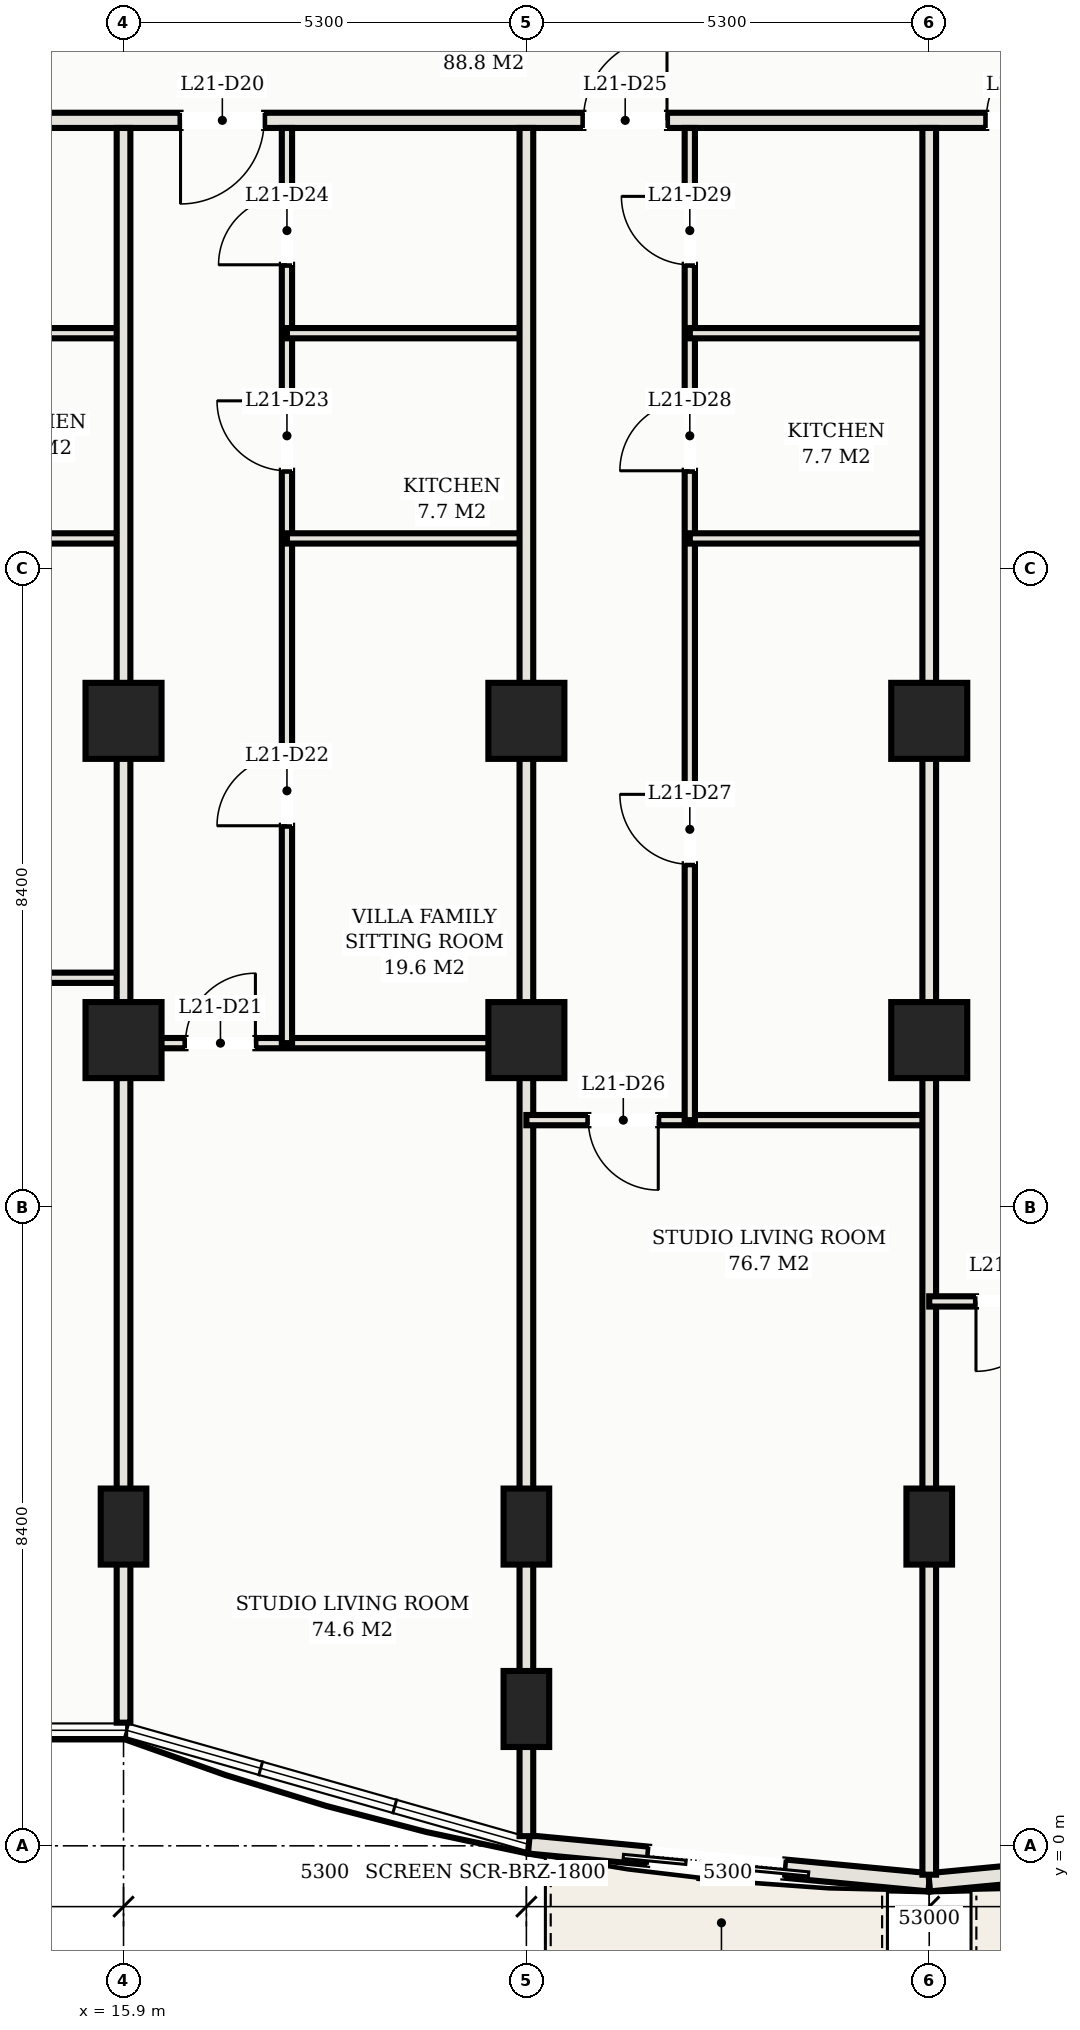
"""IFC4 building model, lengths in metres.
Left out: names, types, materials, properties, quantities, classifications, styles, units other than length and angle.
Written with IfcOpenShell. Run it as: python <this file> out.ifc"""

import sys

from ifc_helpers import new_model, si_unit, direction, frame, frame_2d, origin, origin_2d, place, context, subcontext, project, spatial, rectangle, hollow_rectangle, extrude, element, fill, save


model = new_model("IFC4")
c1 = context("Model", 3, precision=1e-05, world=origin(), true_north=direction((0.0, 1.0)))
c2 = subcontext(c1, "Body", "Model", "MODEL_VIEW")
j1 = project(units=[si_unit("LENGTHUNIT", "METRE"), si_unit("PLANEANGLEUNIT", "RADIAN")], contexts=[c1])
p1 = place(None, origin())
s1 = spatial("IfcSite", under=j1, at=p1, CompositionType="ELEMENT")
p2 = place(p1, origin())
s2 = spatial("IfcBuilding", under=s1, at=p2, CompositionType="ELEMENT")
p3 = place(p2, frame((0.0, 0.0, 81.7)))
s3 = spatial("IfcBuildingStorey", under=s2, at=p3, CompositionType="ELEMENT", Elevation=81.7)
for number, where, z_axis, x_axis in (
    (1, (15.9, 14.8, 0.0), (0.0, 0.0, 1.0), (1.0, 0.0, 0.0)),
    (2, (15.9, 10.6, 0.0), (0.0, 0.0, 1.0), (1.0, 0.0, 0.0)),
    (3, (21.2, 14.8, 0.0), (0.0, 0.0, 1.0), (1.0, 0.0, 0.0)),
    (4, (21.2, 10.6, 0.0), (0.0, 0.0, 1.0), (1.0, 0.0, 0.0)),
    (5, (26.5, 14.8, 0.0), (0.0, 0.0, 1.0), (1.0, 0.0, 0.0)),
    (6, (26.5, 10.6, 0.0), (0.0, 0.0, 1.0), (1.0, 0.0, 0.0)),
):
    element("IfcColumn", number, at=place(p3, frame(where, z_axis=z_axis, x_axis=x_axis)), inside=s3, PredefinedType="COLUMN", context=c2, shape_type="SweptSolid", body=[
        extrude(hollow_rectangle(XDim=1.0, YDim=1.0, WallThickness=0.036, at=origin_2d()), origin(), (0.0, 0.0, 1.0), 3.3),
    ])
for number, where, z_axis, x_axis in (
    (7, (21.2, 1.8, 0.0), (0.0, 0.0, 1.0), (1.0, 0.0, 0.0)),
    (8, (15.9, 4.2, 0.0), (0.0, 0.0, 1.0), (1.0, 0.0, 0.0)),
    (9, (21.2, 4.2, 0.0), (0.0, 0.0, 1.0), (1.0, 0.0, 0.0)),
    (10, (26.5, 4.2, 0.0), (0.0, 0.0, 1.0), (1.0, 0.0, 0.0)),
):
    element("IfcColumn", number, at=place(p3, frame(where, z_axis=z_axis, x_axis=x_axis)), inside=s3, PredefinedType="COLUMN", context=c2, shape_type="SweptSolid", body=[
        extrude(hollow_rectangle(XDim=0.6, YDim=1.0, WallThickness=0.032, at=origin_2d()), origin(), (0.0, 0.0, 1.0), 3.3),
    ])
p4 = place(p3, frame((21.232, 0.018, 0.0), z_axis=(0.0, 0.0, 1.0), x_axis=(0.995560760834, -0.094121046997, 0.0)))
e11 = element("IfcWall", 11, at=p4, inside=s3, PredefinedType="SOLIDWALL", context=c2, shape_type="SweptSolid", body=[
    extrude(rectangle(XDim=5.292, YDim=0.24, at=frame_2d((2.646, 0.0))), origin(), (0.0, 0.0, 1.0), 3.09),
])
p5 = place(p4, frame((1.577, 0.0, 0.0)))
e12 = element("IfcOpeningElement", 12, at=p5, cuts=e11, PredefinedType="OPENING", context=c2, shape_type="SweptSolid", body=[
    extrude(rectangle(XDim=1.8, YDim=2.2, at=frame_2d((0.9, 1.1))), frame((0.0, 0.13, 0.0), z_axis=(0.0, -1.0, 0.0), x_axis=(1.0, 0.0, 0.0)), (0.0, 0.0, 1.0), 0.26),
])
p6 = place(p3, frame((26.5, -0.48, 0.0), z_axis=(0.0, 0.0, 1.0), x_axis=(0.995560760834, 0.094121046997, 0.0)))
e13 = element("IfcWall", 13, at=p6, inside=s3, PredefinedType="SOLIDWALL", context=c2, shape_type="SweptSolid", body=[
    extrude(rectangle(XDim=5.292, YDim=0.24, at=frame_2d((2.646, 0.0))), origin(), (0.0, 0.0, 1.0), 3.09),
])
p7 = place(p6, frame((1.914, 0.0, 0.0)))
e14 = element("IfcOpeningElement", 14, at=p7, cuts=e13, PredefinedType="OPENING", context=c2, shape_type="SweptSolid", body=[
    extrude(rectangle(XDim=1.8, YDim=2.2, at=frame_2d((0.9, 1.1))), frame((0.0, 0.13, 0.0), z_axis=(0.0, -1.0, 0.0), x_axis=(1.0, 0.0, 0.0)), (0.0, 0.0, 1.0), 0.26),
])
p8 = place(p3, frame((1.62, 22.7, 0.0), z_axis=(0.0, 0.0, 1.0), x_axis=(1.0, 0.0, 0.0)))
e15 = element("IfcWall", 15, at=p8, inside=s3, PredefinedType="PARTITIONING", context=c2, shape_type="SweptSolid", body=[
    extrude(rectangle(XDim=49.76, YDim=0.2, at=frame_2d((24.88, 0.0))), origin(), (0.0, 0.0, 1.0), 2.38),
])
p9 = place(p8, frame((9.73, 0.0, 0.0)))
e16 = element("IfcOpeningElement", 16, at=p9, cuts=e15, PredefinedType="OPENING", context=c2, shape_type="SweptSolid", body=[
    extrude(rectangle(XDim=1.1, YDim=2.25, at=frame_2d((0.55, 1.125))), frame((0.0, 0.11, 0.0), z_axis=(0.0, -1.0, 0.0), x_axis=(1.0, 0.0, 0.0)), (0.0, 0.0, 1.0), 0.22),
])
p10 = place(p8, frame((15.03, 0.0, 0.0)))
e17 = element("IfcOpeningElement", 17, at=p10, cuts=e15, PredefinedType="OPENING", context=c2, shape_type="SweptSolid", body=[
    extrude(rectangle(XDim=1.1, YDim=2.25, at=frame_2d((0.55, 1.125))), frame((0.0, 0.11, 0.0), z_axis=(0.0, -1.0, 0.0), x_axis=(1.0, 0.0, 0.0)), (0.0, 0.0, 1.0), 0.22),
])
p11 = place(p8, frame((20.33, 0.0, 0.0)))
e18 = element("IfcOpeningElement", 18, at=p11, cuts=e15, PredefinedType="OPENING", context=c2, shape_type="SweptSolid", body=[
    extrude(rectangle(XDim=1.1, YDim=2.25, at=frame_2d((0.55, 1.125))), frame((0.0, 0.11, 0.0), z_axis=(0.0, -1.0, 0.0), x_axis=(1.0, 0.0, 0.0)), (0.0, 0.0, 1.0), 0.22),
])
p12 = place(p8, frame((25.63, 0.0, 0.0)))
e19 = element("IfcOpeningElement", 19, at=p12, cuts=e15, PredefinedType="OPENING", context=c2, shape_type="SweptSolid", body=[
    extrude(rectangle(XDim=1.1, YDim=2.25, at=frame_2d((0.55, 1.125))), frame((0.0, 0.11, 0.0), z_axis=(0.0, -1.0, 0.0), x_axis=(1.0, 0.0, 0.0)), (0.0, 0.0, 1.0), 0.22),
])
p13 = place(p8, frame((33.33, 0.0, 0.0)))
e20 = element("IfcOpeningElement", 20, at=p13, cuts=e15, PredefinedType="OPENING", context=c2, shape_type="SweptSolid", body=[
    extrude(rectangle(XDim=1.1, YDim=2.25, at=frame_2d((0.55, 1.125))), frame((0.0, 0.11, 0.0), z_axis=(0.0, -1.0, 0.0), x_axis=(1.0, 0.0, 0.0)), (0.0, 0.0, 1.0), 0.22),
])
p14 = place(p8, frame((3.985, 0.0, 0.0)))
e21 = element("IfcOpeningElement", 21, at=p14, cuts=e15, PredefinedType="OPENING", context=c2, shape_type="SweptSolid", body=[
    extrude(rectangle(XDim=0.92, YDim=2.15, at=frame_2d((0.46, 1.075))), frame((0.0, 0.11, 0.0), z_axis=(0.0, -1.0, 0.0), x_axis=(1.0, 0.0, 0.0)), (0.0, 0.0, 1.0), 0.22),
])
p15 = place(p8, frame((44.855, 0.0, 0.0)))
e22 = element("IfcOpeningElement", 22, at=p15, cuts=e15, PredefinedType="OPENING", context=c2, shape_type="SweptSolid", body=[
    extrude(rectangle(XDim=0.92, YDim=2.15, at=frame_2d((0.46, 1.075))), frame((0.0, 0.11, 0.0), z_axis=(0.0, -1.0, 0.0), x_axis=(1.0, 0.0, 0.0)), (0.0, 0.0, 1.0), 0.22),
])
p16 = place(p3, frame((10.6, 11.42, 0.0), z_axis=(0.0, 0.0, 1.0), x_axis=(1.0, 0.0, 0.0)))
e23 = element("IfcWall", 23, at=p16, inside=s3, PredefinedType="PARTITIONING", context=c2, shape_type="SweptSolid", body=[
    extrude(rectangle(XDim=5.3, YDim=0.135, at=frame_2d((2.65, 0.0))), origin(), (0.0, 0.0, 1.0), 2.38),
])
p17 = place(p16, frame((0.815, 0.0, 0.0)))
e24 = element("IfcOpeningElement", 24, at=p17, cuts=e23, PredefinedType="OPENING", context=c2, shape_type="SweptSolid", body=[
    extrude(rectangle(XDim=0.92, YDim=2.15, at=frame_2d((0.46, 1.075))), frame((0.0, 0.078, 0.0), z_axis=(0.0, -1.0, 0.0), x_axis=(1.0, 0.0, 0.0)), (0.0, 0.0, 1.0), 0.155),
])
for number, where, z_axis, x_axis in (
    (25, (12.75, 17.2, 0.0), (0.0, 0.0, 1.0), (1.0, 0.0, 0.0)),
    (26, (12.75, 19.9, 0.0), (0.0, 0.0, 1.0), (1.0, 0.0, 0.0)),
):
    element("IfcWall", number, at=place(p3, frame(where, z_axis=z_axis, x_axis=x_axis)), inside=s3, PredefinedType="PARTITIONING", context=c2, shape_type="SweptSolid", body=[
        extrude(rectangle(XDim=3.15, YDim=0.135, at=frame_2d((1.575, 0.0))), origin(), (0.0, 0.0, 1.0), 2.38),
    ])
p18 = place(p3, frame((15.9, 1.62, 0.0), z_axis=(0.0, 0.0, 1.0), x_axis=(0.0, 1.0, 0.0)))
e27 = element("IfcWall", 27, at=p18, inside=s3, PredefinedType="PARTITIONING", context=c2, shape_type="SweptSolid", body=[
    extrude(rectangle(XDim=20.98, YDim=0.18, at=frame_2d((10.49, 0.0))), origin(), (0.0, 0.0, 1.0), 2.335),
])
p19 = place(p3, frame((15.9, 10.56, 0.0), z_axis=(0.0, 0.0, 1.0), x_axis=(1.0, 0.0, 0.0)))
e28 = element("IfcWall", 28, at=p19, inside=s3, PredefinedType="PARTITIONING", context=c2, shape_type="SweptSolid", body=[
    extrude(rectangle(XDim=5.3, YDim=0.135, at=frame_2d((2.65, 0.0))), origin(), (0.0, 0.0, 1.0), 2.335),
])
p20 = place(p19, frame((0.815, 0.0, 0.0)))
e29 = element("IfcOpeningElement", 29, at=p20, cuts=e28, PredefinedType="OPENING", context=c2, shape_type="SweptSolid", body=[
    extrude(rectangle(XDim=0.92, YDim=2.15, at=frame_2d((0.46, 1.075))), frame((0.0, 0.078, 0.0), z_axis=(0.0, -1.0, 0.0), x_axis=(1.0, 0.0, 0.0)), (0.0, 0.0, 1.0), 0.155),
])
p21 = place(p3, frame((18.05, 10.56, 0.0), z_axis=(0.0, 0.0, 1.0), x_axis=(0.0, 1.0, 0.0)))
e30 = element("IfcWall", 30, at=p21, inside=s3, PredefinedType="PARTITIONING", context=c2, shape_type="SweptSolid", body=[
    extrude(rectangle(XDim=12.04, YDim=0.135, at=frame_2d((6.02, 0.0))), origin(), (0.0, 0.0, 1.0), 2.38),
])
p22 = place(p21, frame((2.86, 0.0, 0.0)))
e31 = element("IfcOpeningElement", 31, at=p22, cuts=e30, PredefinedType="OPENING", context=c2, shape_type="SweptSolid", body=[
    extrude(rectangle(XDim=0.92, YDim=2.15, at=frame_2d((0.46, 1.075))), frame((0.0, 0.078, 0.0), z_axis=(0.0, -1.0, 0.0), x_axis=(1.0, 0.0, 0.0)), (0.0, 0.0, 1.0), 0.155),
])
p23 = place(p21, frame((7.53, 0.0, 0.0)))
e32 = element("IfcOpeningElement", 32, at=p23, cuts=e30, PredefinedType="OPENING", context=c2, shape_type="SweptSolid", body=[
    extrude(rectangle(XDim=0.92, YDim=2.15, at=frame_2d((0.46, 1.075))), frame((0.0, 0.078, 0.0), z_axis=(0.0, -1.0, 0.0), x_axis=(1.0, 0.0, 0.0)), (0.0, 0.0, 1.0), 0.155),
])
p24 = place(p21, frame((10.24, 0.0, 0.0)))
e33 = element("IfcOpeningElement", 33, at=p24, cuts=e30, PredefinedType="OPENING", context=c2, shape_type="SweptSolid", body=[
    extrude(rectangle(XDim=0.9, YDim=2.15, at=frame_2d((0.45, 1.075))), frame((0.0, 0.078, 0.0), z_axis=(0.0, -1.0, 0.0), x_axis=(1.0, 0.0, 0.0)), (0.0, 0.0, 1.0), 0.155),
])
for number, where, z_axis, x_axis in (
    (34, (18.05, 17.2, 0.0), (0.0, 0.0, 1.0), (1.0, 0.0, 0.0)),
    (35, (18.05, 19.9, 0.0), (0.0, 0.0, 1.0), (1.0, 0.0, 0.0)),
):
    element("IfcWall", number, at=place(p3, frame(where, z_axis=z_axis, x_axis=x_axis)), inside=s3, PredefinedType="PARTITIONING", context=c2, shape_type="SweptSolid", body=[
        extrude(rectangle(XDim=3.15, YDim=0.135, at=frame_2d((1.575, 0.0))), origin(), (0.0, 0.0, 1.0), 2.38),
    ])
p25 = place(p3, frame((21.2, 0.127, 0.0), z_axis=(0.0, 0.0, 1.0), x_axis=(0.0, 1.0, 0.0)))
e36 = element("IfcWall", 36, at=p25, inside=s3, PredefinedType="PARTITIONING", context=c2, shape_type="SweptSolid", body=[
    extrude(rectangle(XDim=22.473, YDim=0.18, at=frame_2d((11.237, 0.0))), origin(), (0.0, 0.0, 1.0), 2.335),
])
p26 = place(p3, frame((21.2, 9.547, 0.0), z_axis=(0.0, 0.0, 1.0), x_axis=(1.0, 0.0, 0.0)))
e37 = element("IfcWall", 37, at=p26, inside=s3, PredefinedType="PARTITIONING", context=c2, shape_type="SweptSolid", body=[
    extrude(rectangle(XDim=5.3, YDim=0.135, at=frame_2d((2.65, 0.0))), origin(), (0.0, 0.0, 1.0), 2.38),
])
p27 = place(p26, frame((0.815, 0.0, 0.0)))
e38 = element("IfcOpeningElement", 38, at=p27, cuts=e37, PredefinedType="OPENING", context=c2, shape_type="SweptSolid", body=[
    extrude(rectangle(XDim=0.92, YDim=2.15, at=frame_2d((0.46, 1.075))), frame((0.0, 0.078, 0.0), z_axis=(0.0, -1.0, 0.0), x_axis=(1.0, 0.0, 0.0)), (0.0, 0.0, 1.0), 0.155),
])
p28 = place(p3, frame((23.35, 9.547, 0.0), z_axis=(0.0, 0.0, 1.0), x_axis=(0.0, 1.0, 0.0)))
e39 = element("IfcWall", 39, at=p28, inside=s3, PredefinedType="PARTITIONING", context=c2, shape_type="SweptSolid", body=[
    extrude(rectangle(XDim=13.053, YDim=0.135, at=frame_2d((6.526, 0.0))), origin(), (0.0, 0.0, 1.0), 2.38),
])
p29 = place(p28, frame((3.366, 0.0, 0.0)))
e40 = element("IfcOpeningElement", 40, at=p29, cuts=e39, PredefinedType="OPENING", context=c2, shape_type="SweptSolid", body=[
    extrude(rectangle(XDim=0.92, YDim=2.15, at=frame_2d((0.46, 1.075))), frame((0.0, 0.078, 0.0), z_axis=(0.0, -1.0, 0.0), x_axis=(1.0, 0.0, 0.0)), (0.0, 0.0, 1.0), 0.155),
])
p30 = place(p28, frame((8.543, 0.0, 0.0)))
e41 = element("IfcOpeningElement", 41, at=p30, cuts=e39, PredefinedType="OPENING", context=c2, shape_type="SweptSolid", body=[
    extrude(rectangle(XDim=0.92, YDim=2.15, at=frame_2d((0.46, 1.075))), frame((0.0, 0.078, 0.0), z_axis=(0.0, -1.0, 0.0), x_axis=(1.0, 0.0, 0.0)), (0.0, 0.0, 1.0), 0.155),
])
p31 = place(p28, frame((11.253, 0.0, 0.0)))
e42 = element("IfcOpeningElement", 42, at=p31, cuts=e39, PredefinedType="OPENING", context=c2, shape_type="SweptSolid", body=[
    extrude(rectangle(XDim=0.9, YDim=2.15, at=frame_2d((0.45, 1.075))), frame((0.0, 0.078, 0.0), z_axis=(0.0, -1.0, 0.0), x_axis=(1.0, 0.0, 0.0)), (0.0, 0.0, 1.0), 0.155),
])
for number, where, z_axis, x_axis in (
    (43, (23.35, 17.2, 0.0), (0.0, 0.0, 1.0), (1.0, 0.0, 0.0)),
    (44, (23.35, 19.9, 0.0), (0.0, 0.0, 1.0), (1.0, 0.0, 0.0)),
):
    element("IfcWall", number, at=place(p3, frame(where, z_axis=z_axis, x_axis=x_axis)), inside=s3, PredefinedType="PARTITIONING", context=c2, shape_type="SweptSolid", body=[
        extrude(rectangle(XDim=3.15, YDim=0.135, at=frame_2d((1.575, 0.0))), origin(), (0.0, 0.0, 1.0), 2.38),
    ])
p32 = place(p3, frame((26.5, -0.38, 0.0), z_axis=(0.0, 0.0, 1.0), x_axis=(0.0, 1.0, 0.0)))
e45 = element("IfcWall", 45, at=p32, inside=s3, PredefinedType="PARTITIONING", context=c2, shape_type="SweptSolid", body=[
    extrude(rectangle(XDim=22.98, YDim=0.18, at=frame_2d((11.49, 0.0))), origin(), (0.0, 0.0, 1.0), 2.335),
])
p33 = place(p3, frame((26.5, 7.162, 0.0), z_axis=(0.0, 0.0, 1.0), x_axis=(1.0, 0.0, 0.0)))
e46 = element("IfcWall", 46, at=p33, inside=s3, PredefinedType="PARTITIONING", context=c2, shape_type="SweptSolid", body=[
    extrude(rectangle(XDim=7.7, YDim=0.135, at=frame_2d((3.85, 0.0))), origin(), (0.0, 0.0, 1.0), 2.38),
])
p34 = place(p33, frame((0.615, 0.0, 0.0)))
e47 = element("IfcOpeningElement", 47, at=p34, cuts=e46, PredefinedType="OPENING", context=c2, shape_type="SweptSolid", body=[
    extrude(rectangle(XDim=0.92, YDim=2.15, at=frame_2d((0.46, 1.075))), frame((0.0, 0.078, 0.0), z_axis=(0.0, -1.0, 0.0), x_axis=(1.0, 0.0, 0.0)), (0.0, 0.0, 1.0), 0.155),
])
p35 = place(p5, frame((1.8, 0.0, 0.0), z_axis=(0.0, 0.0, 1.0), x_axis=(-1.0, 0.0, 0.0)))
e48 = element("IfcDoor", 48, at=p35, inside=s3, OperationType="DOUBLE_DOOR_SLIDING", PredefinedType="DOOR", context=c2, shape_type="SweptSolid", body=[
    extrude(rectangle(XDim=1.8, YDim=2.2, at=frame_2d((0.9, 1.1))), frame((0.0, 0.025, 0.0), z_axis=(0.0, -1.0, 0.0), x_axis=(1.0, 0.0, 0.0)), (0.0, 0.0, 1.0), 0.05),
])
fill(e12, e48)
p36 = place(p10, frame((1.1, 0.0, 0.0), z_axis=(0.0, 0.0, 1.0), x_axis=(-1.0, 0.0, 0.0)))
e49 = element("IfcDoor", 49, at=p36, inside=s3, OperationType="SINGLE_SWING_RIGHT", PredefinedType="DOOR", context=c2, shape_type="SweptSolid", body=[
    extrude(rectangle(XDim=1.1, YDim=2.25, at=frame_2d((0.55, 1.125))), frame((0.0, 0.025, 0.0), z_axis=(0.0, -1.0, 0.0), x_axis=(1.0, 0.0, 0.0)), (0.0, 0.0, 1.0), 0.05),
])
fill(e17, e49)
p37 = place(p20, origin())
e50 = element("IfcDoor", 50, at=p37, inside=s3, OperationType="SINGLE_SWING_RIGHT", PredefinedType="DOOR", context=c2, shape_type="SweptSolid", body=[
    extrude(rectangle(XDim=0.92, YDim=2.15, at=frame_2d((0.46, 1.075))), frame((0.0, 0.025, 0.0), z_axis=(0.0, -1.0, 0.0), x_axis=(1.0, 0.0, 0.0)), (0.0, 0.0, 1.0), 0.05),
])
fill(e29, e50)
p38 = place(p22, origin())
e51 = element("IfcDoor", 51, at=p38, inside=s3, OperationType="SINGLE_SWING_LEFT", PredefinedType="DOOR", context=c2, shape_type="SweptSolid", body=[
    extrude(rectangle(XDim=0.92, YDim=2.15, at=frame_2d((0.46, 1.075))), frame((0.0, 0.025, 0.0), z_axis=(0.0, -1.0, 0.0), x_axis=(1.0, 0.0, 0.0)), (0.0, 0.0, 1.0), 0.05),
])
fill(e31, e51)
p39 = place(p23, origin())
e52 = element("IfcDoor", 52, at=p39, inside=s3, OperationType="SINGLE_SWING_RIGHT", PredefinedType="DOOR", context=c2, shape_type="SweptSolid", body=[
    extrude(rectangle(XDim=0.92, YDim=2.15, at=frame_2d((0.46, 1.075))), frame((0.0, 0.025, 0.0), z_axis=(0.0, -1.0, 0.0), x_axis=(1.0, 0.0, 0.0)), (0.0, 0.0, 1.0), 0.05),
])
fill(e32, e52)
p40 = place(p24, origin())
e53 = element("IfcDoor", 53, at=p40, inside=s3, OperationType="SINGLE_SWING_LEFT", PredefinedType="DOOR", context=c2, shape_type="SweptSolid", body=[
    extrude(rectangle(XDim=0.9, YDim=2.15, at=frame_2d((0.45, 1.075))), frame((0.0, 0.025, 0.0), z_axis=(0.0, -1.0, 0.0), x_axis=(1.0, 0.0, 0.0)), (0.0, 0.0, 1.0), 0.05),
])
fill(e33, e53)
p41 = place(p11, origin())
e54 = element("IfcDoor", 54, at=p41, inside=s3, OperationType="SINGLE_SWING_RIGHT", PredefinedType="DOOR", context=c2, shape_type="SweptSolid", body=[
    extrude(rectangle(XDim=1.1, YDim=2.25, at=frame_2d((0.55, 1.125))), frame((0.0, 0.025, 0.0), z_axis=(0.0, -1.0, 0.0), x_axis=(1.0, 0.0, 0.0)), (0.0, 0.0, 1.0), 0.05),
])
fill(e18, e54)
p42 = place(p27, frame((0.92, 0.0, 0.0), z_axis=(0.0, 0.0, 1.0), x_axis=(-1.0, 0.0, 0.0)))
e55 = element("IfcDoor", 55, at=p42, inside=s3, OperationType="SINGLE_SWING_LEFT", PredefinedType="DOOR", context=c2, shape_type="SweptSolid", body=[
    extrude(rectangle(XDim=0.92, YDim=2.15, at=frame_2d((0.46, 1.075))), frame((0.0, 0.025, 0.0), z_axis=(0.0, -1.0, 0.0), x_axis=(1.0, 0.0, 0.0)), (0.0, 0.0, 1.0), 0.05),
])
fill(e38, e55)
p43 = place(p29, origin())
e56 = element("IfcDoor", 56, at=p43, inside=s3, OperationType="SINGLE_SWING_RIGHT", PredefinedType="DOOR", context=c2, shape_type="SweptSolid", body=[
    extrude(rectangle(XDim=0.92, YDim=2.15, at=frame_2d((0.46, 1.075))), frame((0.0, 0.025, 0.0), z_axis=(0.0, -1.0, 0.0), x_axis=(1.0, 0.0, 0.0)), (0.0, 0.0, 1.0), 0.05),
])
fill(e40, e56)
p44 = place(p30, origin())
e57 = element("IfcDoor", 57, at=p44, inside=s3, OperationType="SINGLE_SWING_LEFT", PredefinedType="DOOR", context=c2, shape_type="SweptSolid", body=[
    extrude(rectangle(XDim=0.92, YDim=2.15, at=frame_2d((0.46, 1.075))), frame((0.0, 0.025, 0.0), z_axis=(0.0, -1.0, 0.0), x_axis=(1.0, 0.0, 0.0)), (0.0, 0.0, 1.0), 0.05),
])
fill(e41, e57)
p45 = place(p31, origin())
e58 = element("IfcDoor", 58, at=p45, inside=s3, OperationType="SINGLE_SWING_RIGHT", PredefinedType="DOOR", context=c2, shape_type="SweptSolid", body=[
    extrude(rectangle(XDim=0.9, YDim=2.15, at=frame_2d((0.45, 1.075))), frame((0.0, 0.025, 0.0), z_axis=(0.0, -1.0, 0.0), x_axis=(1.0, 0.0, 0.0)), (0.0, 0.0, 1.0), 0.05),
])
fill(e42, e58)
p46 = place(p12, origin())
e59 = element("IfcDoor", 59, at=p46, inside=s3, OperationType="SINGLE_SWING_RIGHT", PredefinedType="DOOR", context=c2, shape_type="SweptSolid", body=[
    extrude(rectangle(XDim=1.1, YDim=2.25, at=frame_2d((0.55, 1.125))), frame((0.0, 0.025, 0.0), z_axis=(0.0, -1.0, 0.0), x_axis=(1.0, 0.0, 0.0)), (0.0, 0.0, 1.0), 0.05),
])
fill(e19, e59)
p47 = place(p34, frame((0.92, 0.0, 0.0), z_axis=(0.0, 0.0, 1.0), x_axis=(-1.0, 0.0, 0.0)))
e60 = element("IfcDoor", 60, at=p47, inside=s3, OperationType="SINGLE_SWING_RIGHT", PredefinedType="DOOR", context=c2, shape_type="SweptSolid", body=[
    extrude(rectangle(XDim=0.92, YDim=2.15, at=frame_2d((0.46, 1.075))), frame((0.0, 0.025, 0.0), z_axis=(0.0, -1.0, 0.0), x_axis=(1.0, 0.0, 0.0)), (0.0, 0.0, 1.0), 0.05),
])
fill(e47, e60)
save(model, sys.argv[1])
